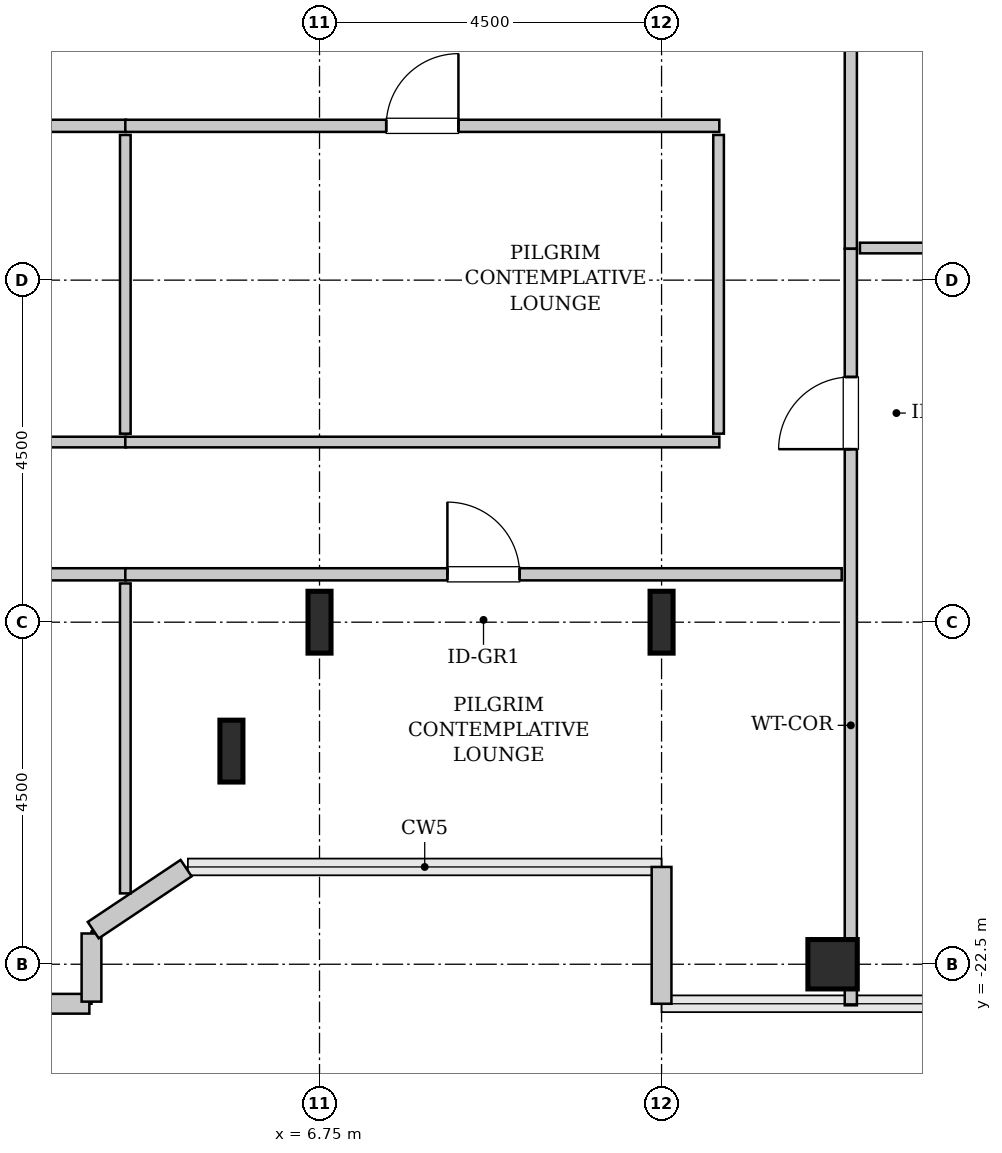
"""IFC4 building model, lengths in metres.
Left out: names, types, materials, properties, quantities, classifications, styles, units other than length and angle.
Written with IfcOpenShell. Run it as: python <this file> out.ifc"""

import sys

from ifc_helpers import new_model, si_unit, direction, frame, frame_2d, origin, origin_2d, place, context, subcontext, project, spatial, rectangle, hollow_rectangle, i_section, extrude, source, transform, mapped, element, fill, save


model = new_model("IFC4")
c1 = context("Model", 3, precision=1e-05, world=origin(), true_north=direction((0.0, 1.0)))
c2 = subcontext(c1, "Body", "Model", "MODEL_VIEW")
j1 = project(units=[si_unit("LENGTHUNIT", "METRE"), si_unit("PLANEANGLEUNIT", "RADIAN")], contexts=[c1])
p1 = place(None, origin())
s1 = spatial("IfcSite", under=j1, at=p1, CompositionType="ELEMENT")
p2 = place(p1, origin())
s2 = spatial("IfcBuilding", under=s1, at=p2, CompositionType="ELEMENT")
p3 = place(p2, frame((0.0, 0.0, 221.8)))
s3 = spatial("IfcBuildingStorey", under=s2, at=p3, CompositionType="ELEMENT", Elevation=221.8)
m1 = source(origin(), c2, "Body", "SweptSolid", [
    extrude(i_section(OverallWidth=0.303, OverallDepth=0.814, WebThickness=0.021, FlangeThickness=0.04, FilletRadius=0.03, at=origin_2d()), origin(), (0.0, 0.0, 1.0), 3.8),
])
for number, where, z_axis, x_axis in (
    (1, (5.591, -19.696, 0.0), (0.0, 0.0, 1.0), (1.0, 0.0, 0.0)),
    (2, (6.75, -18.0, 0.0), (0.0, 0.0, 1.0), (1.0, 0.0, 0.0)),
    (3, (11.25, -18.0, 0.0), (0.0, 0.0, 1.0), (1.0, 0.0, 0.0)),
):
    element("IfcColumn", number, at=place(p3, frame(where, z_axis=z_axis, x_axis=x_axis)), inside=s3, PredefinedType="COLUMN", context=c2, shape_type="MappedRepresentation", body=[
        mapped(m1, transform((0.0, 0.0, 0.0), x_axis=(1.0, 0.0, 0.0), y_axis=(0.0, 1.0, 0.0), z_axis=(0.0, 0.0, 1.0), scale=1.0)),
    ])
m2 = source(origin(), c2, "Body", "SweptSolid", [
    extrude(hollow_rectangle(XDim=0.65, YDim=0.65, WallThickness=0.032, InnerFilletRadius=0.032, OuterFilletRadius=0.064, at=origin_2d()), origin(), (0.0, 0.0, 1.0), 3.8),
])
p4 = place(p3, frame((13.5, -22.5, 0.0), z_axis=(0.0, 0.0, 1.0), x_axis=(1.0, 0.0, 0.0)))
e4 = element("IfcColumn", 4, at=p4, inside=s3, PredefinedType="COLUMN", context=c2, shape_type="MappedRepresentation", body=[
    mapped(m2, transform((0.0, 0.0, 0.0), x_axis=(1.0, 0.0, 0.0), y_axis=(0.0, 1.0, 0.0), z_axis=(0.0, 0.0, 1.0), scale=1.0)),
])
m3 = source(origin(), c2, "Body", "SweptSolid", [
    extrude(rectangle(XDim=1.8, YDim=0.26, at=frame_2d((0.9, 0.0))), origin(), (0.0, 0.0, 1.0), 3.55),
])
p5 = place(p3, frame((11.25, -21.22, 0.0), z_axis=(0.0, 0.0, 1.0), x_axis=(0.0, -1.0, 0.0)))
e5 = element("IfcWall", 5, at=p5, inside=s3, PredefinedType="SOLIDWALL", context=c2, shape_type="MappedRepresentation", body=[
    mapped(m3, transform((0.0, 0.0, 0.0), x_axis=(1.0, 0.0, 0.0), y_axis=(0.0, 1.0, 0.0), z_axis=(0.0, 0.0, 1.0), scale=1.0)),
])
m4 = source(origin(), c2, "Body", "SweptSolid", [
    extrude(rectangle(XDim=1.37, YDim=0.26, at=frame_2d((0.685, 0.0))), origin(), (0.0, 0.0, 1.0), 3.55),
])
p6 = place(p3, frame((2.352, -23.02, 0.0), z_axis=(0.0, 0.0, 1.0), x_axis=(1.0, 0.0, 0.0)))
e6 = element("IfcWall", 6, at=p6, inside=s3, PredefinedType="SOLIDWALL", context=c2, shape_type="MappedRepresentation", body=[
    mapped(m4, transform((0.0, 0.0, 0.0), x_axis=(1.0, 0.0, 0.0), y_axis=(0.0, 1.0, 0.0), z_axis=(0.0, 0.0, 1.0), scale=1.0)),
])
m5 = source(origin(), c2, "Body", "SweptSolid", [
    extrude(rectangle(XDim=0.897, YDim=0.26, at=frame_2d((0.448, 0.0))), origin(), (0.0, 0.0, 1.0), 3.55),
])
p7 = place(p3, frame((3.75, -22.992, 0.0), z_axis=(0.0, 0.0, 1.0), x_axis=(0.0, 1.0, 0.0)))
e7 = element("IfcWall", 7, at=p7, inside=s3, PredefinedType="SOLIDWALL", context=c2, shape_type="MappedRepresentation", body=[
    mapped(m5, transform((0.0, 0.0, 0.0), x_axis=(1.0, 0.0, 0.0), y_axis=(0.0, 1.0, 0.0), z_axis=(0.0, 0.0, 1.0), scale=1.0)),
])
m6 = source(origin(), c2, "Body", "SweptSolid", [
    extrude(rectangle(XDim=1.469, YDim=0.26, at=frame_2d((0.734, 0.0))), origin(), (0.0, 0.0, 1.0), 3.55),
])
p8 = place(p3, frame((3.773, -22.052, 0.0), z_axis=(0.0, 0.0, 1.0), x_axis=(0.831461760506, 0.555581983884, 0.0)))
e8 = element("IfcWall", 8, at=p8, inside=s3, PredefinedType="SOLIDWALL", context=c2, shape_type="MappedRepresentation", body=[
    mapped(m6, transform((0.0, 0.0, 0.0), x_axis=(1.0, 0.0, 0.0), y_axis=(0.0, 1.0, 0.0), z_axis=(0.0, 0.0, 1.0), scale=1.0)),
])
m7 = source(origin(), c2, "Body", "SweptSolid", [
    extrude(rectangle(XDim=9.892, YDim=0.16, at=frame_2d((4.946, 0.0))), origin(), (0.0, 0.0, 1.0), 3.535),
])
p9 = place(p3, frame((13.74, -13.087, 0.0), z_axis=(0.0, 0.0, 1.0), x_axis=(0.0, 1.0, 0.0)))
e9 = element("IfcWall", 9, at=p9, inside=s3, PredefinedType="PARTITIONING", context=c2, shape_type="MappedRepresentation", body=[
    mapped(m7, transform((0.0, 0.0, 0.0), x_axis=(1.0, 0.0, 0.0), y_axis=(0.0, 1.0, 0.0), z_axis=(0.0, 0.0, 1.0), scale=1.0)),
])
p10 = place(p9, frame((4.471, 0.0, 0.0)))
e10 = element("IfcOpeningElement", 10, at=p10, cuts=e9, PredefinedType="OPENING", context=c2, shape_type="SweptSolid", body=[
    extrude(rectangle(XDim=0.95, YDim=2.1, at=frame_2d((0.475, 1.05))), frame((0.0, 0.09, 0.0), z_axis=(0.0, -1.0, 0.0), x_axis=(1.0, 0.0, 0.0)), (0.0, 0.0, 1.0), 0.18),
])
m8 = source(origin(), c2, "Body", "SweptSolid", [
    extrude(rectangle(XDim=11.43, YDim=0.14, at=frame_2d((5.715, 0.0))), origin(), (0.0, 0.0, 1.0), 2.925),
])
p11 = place(p3, frame((13.86, -13.077, 0.0), z_axis=(0.0, 0.0, 1.0), x_axis=(1.0, 0.0, 0.0)))
e11 = element("IfcWall", 11, at=p11, inside=s3, PredefinedType="PARTITIONING", context=c2, shape_type="MappedRepresentation", body=[
    mapped(m8, transform((0.0, 0.0, 0.0), x_axis=(1.0, 0.0, 0.0), y_axis=(0.0, 1.0, 0.0), z_axis=(0.0, 0.0, 1.0), scale=1.0)),
])
m9 = source(origin(), c2, "Body", "SweptSolid", [
    extrude(rectangle(XDim=9.953, YDim=0.16, at=frame_2d((4.976, 0.0))), origin(), (0.0, 0.0, 1.0), 3.535),
])
p12 = place(p3, frame((13.74, -23.04, 0.0), z_axis=(0.0, 0.0, 1.0), x_axis=(0.0, 1.0, 0.0)))
e12 = element("IfcWall", 12, at=p12, inside=s3, PredefinedType="PARTITIONING", context=c2, shape_type="MappedRepresentation", body=[
    mapped(m9, transform((0.0, 0.0, 0.0), x_axis=(1.0, 0.0, 0.0), y_axis=(0.0, 1.0, 0.0), z_axis=(0.0, 0.0, 1.0), scale=1.0)),
])
p13 = place(p12, frame((7.316, 0.0, 0.0)))
e13 = element("IfcOpeningElement", 13, at=p13, cuts=e12, PredefinedType="OPENING", context=c2, shape_type="SweptSolid", body=[
    extrude(rectangle(XDim=0.95, YDim=2.1, at=frame_2d((0.475, 1.05))), frame((0.0, 0.09, 0.0), z_axis=(0.0, -1.0, 0.0), x_axis=(1.0, 0.0, 0.0)), (0.0, 0.0, 1.0), 0.18),
])
m10 = source(origin(), c2, "Body", "SweptSolid", [
    extrude(rectangle(XDim=6.81, YDim=0.16, at=frame_2d((3.405, 0.0))), origin(), (0.0, 0.0, 1.0), 3.535),
])
p14 = place(p3, frame((-2.605, -17.37, 0.0), z_axis=(0.0, 0.0, 1.0), x_axis=(1.0, 0.0, 0.0)))
e14 = element("IfcWall", 14, at=p14, inside=s3, PredefinedType="PARTITIONING", context=c2, shape_type="MappedRepresentation", body=[
    mapped(m10, transform((0.0, 0.0, 0.0), x_axis=(1.0, 0.0, 0.0), y_axis=(0.0, 1.0, 0.0), z_axis=(0.0, 0.0, 1.0), scale=1.0)),
])
p15 = place(p14, frame((2.93, 0.0, 0.0)))
e15 = element("IfcOpeningElement", 15, at=p15, cuts=e14, PredefinedType="OPENING", context=c2, shape_type="SweptSolid", body=[
    extrude(rectangle(XDim=0.95, YDim=2.1, at=frame_2d((0.475, 1.05))), frame((0.0, 0.09, 0.0), z_axis=(0.0, -1.0, 0.0), x_axis=(1.0, 0.0, 0.0)), (0.0, 0.0, 1.0), 0.18),
])
m11 = source(origin(), c2, "Body", "SweptSolid", [
    extrude(rectangle(XDim=4.078, YDim=0.14, at=frame_2d((2.039, 0.0))), origin(), (0.0, 0.0, 1.0), 3.535),
])
p16 = place(p3, frame((4.195, -21.568, 0.0), z_axis=(0.0, 0.0, 1.0), x_axis=(0.0, 1.0, 0.0)))
e16 = element("IfcWall", 16, at=p16, inside=s3, PredefinedType="PARTITIONING", context=c2, shape_type="MappedRepresentation", body=[
    mapped(m11, transform((0.0, 0.0, 0.0), x_axis=(1.0, 0.0, 0.0), y_axis=(0.0, 1.0, 0.0), z_axis=(0.0, 0.0, 1.0), scale=1.0)),
])
p17 = place(p3, frame((-2.605, -11.47, 0.0), z_axis=(0.0, 0.0, 1.0), x_axis=(1.0, 0.0, 0.0)))
e17 = element("IfcWall", 17, at=p17, inside=s3, PredefinedType="PARTITIONING", context=c2, shape_type="MappedRepresentation", body=[
    mapped(m10, transform((0.0, 0.0, 0.0), x_axis=(1.0, 0.0, 0.0), y_axis=(0.0, 1.0, 0.0), z_axis=(0.0, 0.0, 1.0), scale=1.0)),
])
p18 = place(p17, frame((2.93, 0.0, 0.0)))
e18 = element("IfcOpeningElement", 18, at=p18, cuts=e17, PredefinedType="OPENING", context=c2, shape_type="SweptSolid", body=[
    extrude(rectangle(XDim=0.95, YDim=2.1, at=frame_2d((0.475, 1.05))), frame((0.0, 0.09, 0.0), z_axis=(0.0, -1.0, 0.0), x_axis=(1.0, 0.0, 0.0)), (0.0, 0.0, 1.0), 0.18),
])
m12 = source(origin(), c2, "Body", "SweptSolid", [
    extrude(rectangle(XDim=6.81, YDim=0.14, at=frame_2d((3.405, 0.0))), origin(), (0.0, 0.0, 1.0), 3.535),
])
p19 = place(p3, frame((-2.605, -15.63, 0.0), z_axis=(0.0, 0.0, 1.0), x_axis=(1.0, 0.0, 0.0)))
e19 = element("IfcWall", 19, at=p19, inside=s3, PredefinedType="PARTITIONING", context=c2, shape_type="MappedRepresentation", body=[
    mapped(m12, transform((0.0, 0.0, 0.0), x_axis=(1.0, 0.0, 0.0), y_axis=(0.0, 1.0, 0.0), z_axis=(0.0, 0.0, 1.0), scale=1.0)),
])
m13 = source(origin(), c2, "Body", "SweptSolid", [
    extrude(rectangle(XDim=3.93, YDim=0.14, at=frame_2d((1.965, 0.0))), origin(), (0.0, 0.0, 1.0), 3.535),
])
p20 = place(p3, frame((4.195, -15.52, 0.0), z_axis=(0.0, 0.0, 1.0), x_axis=(0.0, 1.0, 0.0)))
e20 = element("IfcWall", 20, at=p20, inside=s3, PredefinedType="PARTITIONING", context=c2, shape_type="MappedRepresentation", body=[
    mapped(m13, transform((0.0, 0.0, 0.0), x_axis=(1.0, 0.0, 0.0), y_axis=(0.0, 1.0, 0.0), z_axis=(0.0, 0.0, 1.0), scale=1.0)),
])
m14 = source(origin(), c2, "Body", "SweptSolid", [
    extrude(rectangle(XDim=9.425, YDim=0.16, at=frame_2d((4.712, 0.0))), origin(), (0.0, 0.0, 1.0), 3.535),
])
p21 = place(p3, frame((4.195, -17.37, 0.0), z_axis=(0.0, 0.0, 1.0), x_axis=(1.0, 0.0, 0.0)))
e21 = element("IfcWall", 21, at=p21, inside=s3, PredefinedType="PARTITIONING", context=c2, shape_type="MappedRepresentation", body=[
    mapped(m14, transform((0.0, 0.0, 0.0), x_axis=(1.0, 0.0, 0.0), y_axis=(0.0, 1.0, 0.0), z_axis=(0.0, 0.0, 1.0), scale=1.0)),
])
p22 = place(p21, frame((4.238, 0.0, 0.0)))
e22 = element("IfcOpeningElement", 22, at=p22, cuts=e21, PredefinedType="OPENING", context=c2, shape_type="SweptSolid", body=[
    extrude(rectangle(XDim=0.95, YDim=2.1, at=frame_2d((0.475, 1.05))), frame((0.0, 0.09, 0.0), z_axis=(0.0, -1.0, 0.0), x_axis=(1.0, 0.0, 0.0)), (0.0, 0.0, 1.0), 0.18),
])
m15 = source(origin(), c2, "Body", "SweptSolid", [
    extrude(rectangle(XDim=7.815, YDim=0.16, at=frame_2d((3.907, 0.0))), origin(), (0.0, 0.0, 1.0), 3.535),
])
p23 = place(p3, frame((4.195, -11.47, 0.0), z_axis=(0.0, 0.0, 1.0), x_axis=(1.0, 0.0, 0.0)))
e23 = element("IfcWall", 23, at=p23, inside=s3, PredefinedType="PARTITIONING", context=c2, shape_type="MappedRepresentation", body=[
    mapped(m15, transform((0.0, 0.0, 0.0), x_axis=(1.0, 0.0, 0.0), y_axis=(0.0, 1.0, 0.0), z_axis=(0.0, 0.0, 1.0), scale=1.0)),
])
p24 = place(p23, frame((3.433, 0.0, 0.0)))
e24 = element("IfcOpeningElement", 24, at=p24, cuts=e23, PredefinedType="OPENING", context=c2, shape_type="SweptSolid", body=[
    extrude(rectangle(XDim=0.95, YDim=2.1, at=frame_2d((0.475, 1.05))), frame((0.0, 0.09, 0.0), z_axis=(0.0, -1.0, 0.0), x_axis=(1.0, 0.0, 0.0)), (0.0, 0.0, 1.0), 0.18),
])
m16 = source(origin(), c2, "Body", "SweptSolid", [
    extrude(rectangle(XDim=7.815, YDim=0.14, at=frame_2d((3.907, 0.0))), origin(), (0.0, 0.0, 1.0), 3.535),
])
p25 = place(p3, frame((4.195, -15.63, 0.0), z_axis=(0.0, 0.0, 1.0), x_axis=(1.0, 0.0, 0.0)))
e25 = element("IfcWall", 25, at=p25, inside=s3, PredefinedType="PARTITIONING", context=c2, shape_type="MappedRepresentation", body=[
    mapped(m16, transform((0.0, 0.0, 0.0), x_axis=(1.0, 0.0, 0.0), y_axis=(0.0, 1.0, 0.0), z_axis=(0.0, 0.0, 1.0), scale=1.0)),
])
p26 = place(p3, frame((12.0, -15.52, 0.0), z_axis=(0.0, 0.0, 1.0), x_axis=(0.0, 1.0, 0.0)))
e26 = element("IfcWall", 26, at=p26, inside=s3, PredefinedType="PARTITIONING", context=c2, shape_type="MappedRepresentation", body=[
    mapped(m13, transform((0.0, 0.0, 0.0), x_axis=(1.0, 0.0, 0.0), y_axis=(0.0, 1.0, 0.0), z_axis=(0.0, 0.0, 1.0), scale=1.0)),
])
m17 = source(origin(), c2, "Body", "SweptSolid", [
    extrude(rectangle(XDim=0.95, YDim=2.1, at=frame_2d((0.475, 1.05))), frame((0.0, 0.025, 0.0), z_axis=(0.0, -1.0, 0.0), x_axis=(1.0, 0.0, 0.0)), (0.0, 0.0, 1.0), 0.05),
])
p27 = place(p13, origin())
e27 = element("IfcDoor", 27, at=p27, inside=s3, OperationType="SINGLE_SWING_LEFT", PredefinedType="DOOR", context=c2, shape_type="MappedRepresentation", body=[
    mapped(m17, transform((0.0, 0.0, 0.0), x_axis=(1.0, 0.0, 0.0), y_axis=(0.0, 1.0, 0.0), z_axis=(0.0, 0.0, 1.0), scale=1.0)),
])
fill(e13, e27)
p28 = place(p22, origin())
e28 = element("IfcDoor", 28, at=p28, inside=s3, OperationType="SINGLE_SWING_LEFT", PredefinedType="DOOR", context=c2, shape_type="MappedRepresentation", body=[
    mapped(m17, transform((0.0, 0.0, 0.0), x_axis=(1.0, 0.0, 0.0), y_axis=(0.0, 1.0, 0.0), z_axis=(0.0, 0.0, 1.0), scale=1.0)),
])
fill(e22, e28)
p29 = place(p24, origin())
e29 = element("IfcDoor", 29, at=p29, inside=s3, OperationType="SINGLE_SWING_RIGHT", PredefinedType="DOOR", context=c2, shape_type="MappedRepresentation", body=[
    mapped(m17, transform((0.0, 0.0, 0.0), x_axis=(1.0, 0.0, 0.0), y_axis=(0.0, 1.0, 0.0), z_axis=(0.0, 0.0, 1.0), scale=1.0)),
])
fill(e24, e29)
save(model, sys.argv[1])
